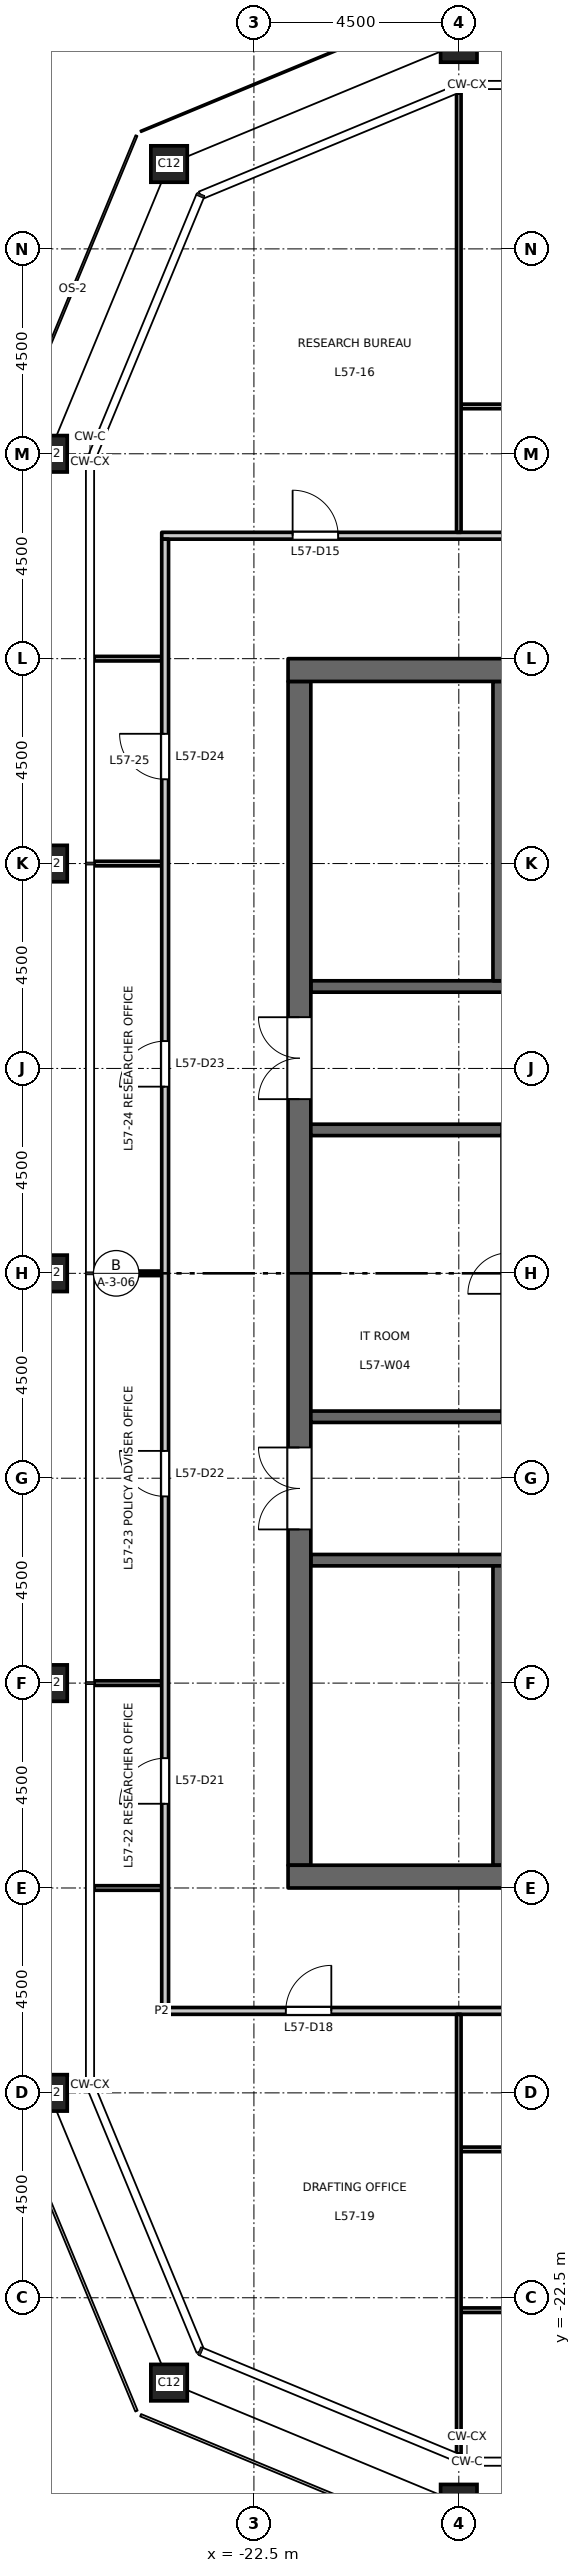
"""IFC4 building model, lengths in metres.
Left out: names, types, materials, properties, quantities, classifications, styles, units other than length and angle.
Written with IfcOpenShell. Run it as: python <this file> out.ifc"""

import sys

from ifc_helpers import new_model, si_unit, direction, frame, frame_2d, origin, origin_2d, place, context, subcontext, project, spatial, rectangle, hollow_rectangle, extrude, element, fill, save


model = new_model("IFC4")
c1 = context("Model", 3, precision=1e-05, world=origin(), true_north=direction((0.0, 1.0)))
c2 = subcontext(c1, "Body", "Model", "MODEL_VIEW")
j1 = project(units=[si_unit("LENGTHUNIT", "METRE"), si_unit("PLANEANGLEUNIT", "RADIAN")], contexts=[c1])
p1 = place(None, origin())
s1 = spatial("IfcSite", under=j1, at=p1, CompositionType="ELEMENT")
p2 = place(p1, origin())
s2 = spatial("IfcBuilding", under=s1, at=p2, CompositionType="ELEMENT")
p3 = place(p2, frame((0.0, 0.0, 264.7)))
s3 = spatial("IfcBuildingStorey", under=s2, at=p3, CompositionType="ELEMENT", Elevation=264.7)
for number, where, z_axis, x_axis in (
    (1, (-18.0, -27.0, 0.0), (0.0, 0.0, 1.0), (1.0, 0.0, 0.0)),
    (2, (-18.0, 27.0, 0.0), (0.0, 0.0, 1.0), (1.0, 0.0, 0.0)),
    (3, (-24.364, 24.364, 0.0), (0.0, 0.0, 1.0), (1.0, 0.0, 0.0)),
    (4, (-27.0, 18.0, 0.0), (0.0, 0.0, 1.0), (1.0, 0.0, 0.0)),
    (5, (-27.0, 9.0, 0.0), (0.0, 0.0, 1.0), (1.0, 0.0, 0.0)),
    (6, (-27.0, 0.0, 0.0), (0.0, 0.0, 1.0), (1.0, 0.0, 0.0)),
    (7, (-27.0, -9.0, 0.0), (0.0, 0.0, 1.0), (1.0, 0.0, 0.0)),
    (8, (-27.0, -18.0, 0.0), (0.0, 0.0, 1.0), (1.0, 0.0, 0.0)),
    (9, (-24.364, -24.364, 0.0), (0.0, 0.0, 1.0), (1.0, 0.0, 0.0)),
):
    element("IfcColumn", number, at=place(p3, frame(where, z_axis=z_axis, x_axis=x_axis)), inside=s3, PredefinedType="COLUMN", context=c2, shape_type="SweptSolid", body=[
        extrude(hollow_rectangle(XDim=0.8, YDim=0.8, WallThickness=0.045, at=origin_2d()), origin(), (0.0, 0.0, 1.0), 4.5),
    ])
p4 = place(p3, frame((-17.0, 6.3, 0.0), z_axis=(0.0, 0.0, 1.0), x_axis=(-1.0, 0.0, 0.0)))
e10 = element("IfcWall", 10, at=p4, inside=s3, PredefinedType="SHEAR", context=c2, shape_type="SweptSolid", body=[
    extrude(rectangle(XDim=4.25, YDim=0.25, at=frame_2d((2.125, 0.0))), origin(), (0.0, 0.0, 1.0), 4.35),
])
p5 = place(p3, frame((-12.15, -6.3, 0.0), z_axis=(0.0, 0.0, 1.0), x_axis=(-1.0, 0.0, 0.0)))
e11 = element("IfcWall", 11, at=p5, inside=s3, PredefinedType="SHEAR", context=c2, shape_type="SweptSolid", body=[
    extrude(rectangle(XDim=9.1, YDim=0.25, at=frame_2d((4.55, 0.0))), origin(), (0.0, 0.0, 1.0), 4.35),
])
p6 = place(p5, frame((1.8, 0.0, 0.0)))
e12 = element("IfcOpeningElement", 12, at=p6, cuts=e11, PredefinedType="OPENING", context=c2, shape_type="SweptSolid", body=[
    extrude(rectangle(XDim=1.0, YDim=2.1, at=frame_2d((0.5, 1.05))), frame((0.0, 0.135, 0.0), z_axis=(0.0, -1.0, 0.0), x_axis=(1.0, 0.0, 0.0)), (0.0, 0.0, 1.0), 0.27),
])
p7 = place(p3, frame((-21.5, -13.0, 0.0), z_axis=(0.0, 0.0, 1.0), x_axis=(0.0, 1.0, 0.0)))
e13 = element("IfcWall", 13, at=p7, inside=s3, PredefinedType="SHEAR", context=c2, shape_type="SweptSolid", body=[
    extrude(rectangle(XDim=26.0, YDim=0.5, at=frame_2d((13.0, 0.0))), origin(), (0.0, 0.0, 1.0), 4.35),
])
p8 = place(p7, frame((16.825, 0.0, 0.0)))
e14 = element("IfcOpeningElement", 14, at=p8, cuts=e13, PredefinedType="OPENING", context=c2, shape_type="SweptSolid", body=[
    extrude(rectangle(XDim=1.8, YDim=2.1, at=frame_2d((0.9, 1.05))), frame((0.0, 0.26, 0.0), z_axis=(0.0, -1.0, 0.0), x_axis=(1.0, 0.0, 0.0)), (0.0, 0.0, 1.0), 0.52),
])
p9 = place(p7, frame((7.375, 0.0, 0.0)))
e15 = element("IfcOpeningElement", 15, at=p9, cuts=e13, PredefinedType="OPENING", context=c2, shape_type="SweptSolid", body=[
    extrude(rectangle(XDim=1.8, YDim=2.1, at=frame_2d((0.9, 1.05))), frame((0.0, 0.26, 0.0), z_axis=(0.0, -1.0, 0.0), x_axis=(1.0, 0.0, 0.0)), (0.0, 0.0, 1.0), 0.52),
])
for number, where, z_axis, x_axis in (
    (16, (-17.05, 3.15, 0.0), (0.0, 0.0, 1.0), (-1.0, 0.0, 0.0)),
    (17, (-17.05, -3.15, 0.0), (0.0, 0.0, 1.0), (-1.0, 0.0, 0.0)),
):
    element("IfcWall", number, at=place(p3, frame(where, z_axis=z_axis, x_axis=x_axis)), inside=s3, PredefinedType="SHEAR", context=c2, shape_type="SweptSolid", body=[
        extrude(rectangle(XDim=4.2, YDim=0.25, at=frame_2d((2.1, 0.0))), origin(), (0.0, 0.0, 1.0), 4.35),
    ])
for number, where, z_axis, x_axis in (
    (18, (-17.0, 6.425, 0.0), (0.0, 0.0, 1.0), (0.0, 1.0, 0.0)),
    (19, (-17.0, -13.0, 0.0), (0.0, 0.0, 1.0), (0.0, 1.0, 0.0)),
):
    element("IfcWall", number, at=place(p3, frame(where, z_axis=z_axis, x_axis=x_axis)), inside=s3, PredefinedType="SHEAR", context=c2, shape_type="SweptSolid", body=[
        extrude(rectangle(XDim=6.575, YDim=0.5, at=frame_2d((3.288, 0.0))), origin(), (0.0, 0.0, 1.0), 4.35),
    ])
for number, where, z_axis, x_axis in (
    (20, (-8.25, 13.25, 0.0), (0.0, 0.0, 1.0), (-1.0, 0.0, 0.0)),
    (21, (-8.25, -13.25, 0.0), (0.0, 0.0, 1.0), (-1.0, 0.0, 0.0)),
):
    element("IfcWall", number, at=place(p3, frame(where, z_axis=z_axis, x_axis=x_axis)), inside=s3, PredefinedType="SHEAR", context=c2, shape_type="SweptSolid", body=[
        extrude(rectangle(XDim=13.5, YDim=0.5, at=frame_2d((6.75, 0.0))), origin(), (0.0, 0.0, 1.0), 4.35),
    ])
p10 = place(p3, frame((-17.95, -22.773, 0.0), z_axis=(0.0, 0.0, 1.0), x_axis=(1.0, 0.0, 0.0)))
e22 = element("IfcWall", 22, at=p10, inside=s3, PredefinedType="PARTITIONING", context=c2, shape_type="SweptSolid", body=[
    extrude(rectangle(XDim=8.9, YDim=0.1, at=frame_2d((4.45, 0.0))), origin(), (0.0, 0.0, 1.0), 4.35),
])
p11 = place(p10, frame((3.85, 0.0, 0.0)))
e23 = element("IfcOpeningElement", 23, at=p11, cuts=e22, PredefinedType="OPENING", context=c2, shape_type="SweptSolid", body=[
    extrude(rectangle(XDim=1.0, YDim=2.1, at=frame_2d((0.5, 1.05))), frame((0.0, 0.06, 0.0), z_axis=(0.0, -1.0, 0.0), x_axis=(1.0, 0.0, 0.0)), (0.0, 0.0, 1.0), 0.12),
])
p12 = place(p3, frame((-17.95, -19.241, 0.0), z_axis=(0.0, 0.0, 1.0), x_axis=(1.0, 0.0, 0.0)))
e24 = element("IfcWall", 24, at=p12, inside=s3, PredefinedType="PARTITIONING", context=c2, shape_type="SweptSolid", body=[
    extrude(rectangle(XDim=8.9, YDim=0.1, at=frame_2d((4.45, 0.0))), origin(), (0.0, 0.0, 1.0), 4.35),
])
p13 = place(p12, frame((3.85, 0.0, 0.0)))
e25 = element("IfcOpeningElement", 25, at=p13, cuts=e24, PredefinedType="OPENING", context=c2, shape_type="SweptSolid", body=[
    extrude(rectangle(XDim=1.0, YDim=2.1, at=frame_2d((0.5, 1.05))), frame((0.0, 0.06, 0.0), z_axis=(0.0, -1.0, 0.0), x_axis=(1.0, 0.0, 0.0)), (0.0, 0.0, 1.0), 0.12),
])
p14 = place(p3, frame((-24.525, -16.2, 0.0), z_axis=(0.0, 0.0, 1.0), x_axis=(1.0, 0.0, 0.0)))
e26 = element("IfcWall", 26, at=p14, inside=s3, PredefinedType="PARTITIONING", context=c2, shape_type="SweptSolid", body=[
    extrude(rectangle(XDim=49.05, YDim=0.15, at=frame_2d((24.525, 0.0))), origin(), (0.0, 0.0, 1.0), 4.35),
])
p15 = place(p14, frame((10.425, 0.0, 0.0)))
e27 = element("IfcOpeningElement", 27, at=p15, cuts=e26, PredefinedType="OPENING", context=c2, shape_type="SweptSolid", body=[
    extrude(rectangle(XDim=1.0, YDim=2.1, at=frame_2d((0.5, 1.05))), frame((0.0, 0.085, 0.0), z_axis=(0.0, -1.0, 0.0), x_axis=(1.0, 0.0, 0.0)), (0.0, 0.0, 1.0), 0.17),
])
p16 = place(p14, frame((19.425, 0.0, 0.0)))
e28 = element("IfcOpeningElement", 28, at=p16, cuts=e26, PredefinedType="OPENING", context=c2, shape_type="SweptSolid", body=[
    extrude(rectangle(XDim=1.0, YDim=2.1, at=frame_2d((0.5, 1.05))), frame((0.0, 0.085, 0.0), z_axis=(0.0, -1.0, 0.0), x_axis=(1.0, 0.0, 0.0)), (0.0, 0.0, 1.0), 0.17),
])
p17 = place(p14, frame((28.425, 0.0, 0.0)))
e29 = element("IfcOpeningElement", 29, at=p17, cuts=e26, PredefinedType="OPENING", context=c2, shape_type="SweptSolid", body=[
    extrude(rectangle(XDim=1.0, YDim=2.1, at=frame_2d((0.5, 1.05))), frame((0.0, 0.085, 0.0), z_axis=(0.0, -1.0, 0.0), x_axis=(1.0, 0.0, 0.0)), (0.0, 0.0, 1.0), 0.17),
])
p18 = place(p14, frame((35.175, 0.0, 0.0)))
e30 = element("IfcOpeningElement", 30, at=p18, cuts=e26, PredefinedType="OPENING", context=c2, shape_type="SweptSolid", body=[
    extrude(rectangle(XDim=1.0, YDim=2.1, at=frame_2d((0.5, 1.05))), frame((0.0, 0.085, 0.0), z_axis=(0.0, -1.0, 0.0), x_axis=(1.0, 0.0, 0.0)), (0.0, 0.0, 1.0), 0.17),
])
p19 = place(p14, frame((39.675, 0.0, 0.0)))
e31 = element("IfcOpeningElement", 31, at=p19, cuts=e26, PredefinedType="OPENING", context=c2, shape_type="SweptSolid", body=[
    extrude(rectangle(XDim=1.0, YDim=2.1, at=frame_2d((0.5, 1.05))), frame((0.0, 0.085, 0.0), z_axis=(0.0, -1.0, 0.0), x_axis=(1.0, 0.0, 0.0)), (0.0, 0.0, 1.0), 0.17),
])
p20 = place(p14, frame((2.725, 0.0, 0.0)))
e32 = element("IfcOpeningElement", 32, at=p20, cuts=e26, PredefinedType="OPENING", context=c2, shape_type="SweptSolid", body=[
    extrude(rectangle(XDim=1.0, YDim=2.1, at=frame_2d((0.5, 1.05))), frame((0.0, 0.085, 0.0), z_axis=(0.0, -1.0, 0.0), x_axis=(1.0, 0.0, 0.0)), (0.0, 0.0, 1.0), 0.17),
])
p21 = place(p3, frame((-26.01, -13.5, 0.0), z_axis=(0.0, 0.0, 1.0), x_axis=(1.0, 0.0, 0.0)))
e33 = element("IfcWall", 33, at=p21, inside=s3, PredefinedType="PARTITIONING", context=c2, shape_type="SweptSolid", body=[
    extrude(rectangle(XDim=1.485, YDim=0.1, at=frame_2d((0.743, 0.0))), origin(), (0.0, 0.0, 1.0), 3.95),
])
for number, where, z_axis, x_axis in (
    (34, (-26.01, -9.0, 0.0), (0.0, 0.0, 1.0), (1.0, 0.0, 0.0)),
    (35, (-26.01, 0.0, 0.0), (0.0, 0.0, 1.0), (1.0, 0.0, 0.0)),
    (36, (-26.01, 9.0, 0.0), (0.0, 0.0, 1.0), (1.0, 0.0, 0.0)),
    (37, (-26.01, 13.5, 0.0), (0.0, 0.0, 1.0), (1.0, 0.0, 0.0)),
):
    element("IfcWall", number, at=place(p3, frame(where, z_axis=z_axis, x_axis=x_axis)), inside=s3, PredefinedType="PARTITIONING", context=c2, shape_type="SweptSolid", body=[
        extrude(rectangle(XDim=1.485, YDim=0.1, at=frame_2d((0.743, 0.0))), origin(), (0.0, 0.0, 1.0), 4.35),
    ])
p22 = place(p3, frame((-24.525, 16.2, 0.0), z_axis=(0.0, 0.0, 1.0), x_axis=(1.0, 0.0, 0.0)))
e38 = element("IfcWall", 38, at=p22, inside=s3, PredefinedType="PARTITIONING", context=c2, shape_type="SweptSolid", body=[
    extrude(rectangle(XDim=49.05, YDim=0.15, at=frame_2d((24.525, 0.0))), origin(), (0.0, 0.0, 1.0), 4.35),
])
p23 = place(p22, frame((10.625, 0.0, 0.0)))
e39 = element("IfcOpeningElement", 39, at=p23, cuts=e38, PredefinedType="OPENING", context=c2, shape_type="SweptSolid", body=[
    extrude(rectangle(XDim=1.0, YDim=2.1, at=frame_2d((0.5, 1.05))), frame((0.0, 0.085, 0.0), z_axis=(0.0, -1.0, 0.0), x_axis=(1.0, 0.0, 0.0)), (0.0, 0.0, 1.0), 0.17),
])
p24 = place(p22, frame((19.625, 0.0, 0.0)))
e40 = element("IfcOpeningElement", 40, at=p24, cuts=e38, PredefinedType="OPENING", context=c2, shape_type="SweptSolid", body=[
    extrude(rectangle(XDim=1.0, YDim=2.1, at=frame_2d((0.5, 1.05))), frame((0.0, 0.085, 0.0), z_axis=(0.0, -1.0, 0.0), x_axis=(1.0, 0.0, 0.0)), (0.0, 0.0, 1.0), 0.17),
])
p25 = place(p22, frame((28.625, 0.0, 0.0)))
e41 = element("IfcOpeningElement", 41, at=p25, cuts=e38, PredefinedType="OPENING", context=c2, shape_type="SweptSolid", body=[
    extrude(rectangle(XDim=1.0, YDim=2.1, at=frame_2d((0.5, 1.05))), frame((0.0, 0.085, 0.0), z_axis=(0.0, -1.0, 0.0), x_axis=(1.0, 0.0, 0.0)), (0.0, 0.0, 1.0), 0.17),
])
p26 = place(p22, frame((37.625, 0.0, 0.0)))
e42 = element("IfcOpeningElement", 42, at=p26, cuts=e38, PredefinedType="OPENING", context=c2, shape_type="SweptSolid", body=[
    extrude(rectangle(XDim=1.0, YDim=2.1, at=frame_2d((0.5, 1.05))), frame((0.0, 0.085, 0.0), z_axis=(0.0, -1.0, 0.0), x_axis=(1.0, 0.0, 0.0)), (0.0, 0.0, 1.0), 0.17),
])
p27 = place(p22, frame((2.875, 0.0, 0.0)))
e43 = element("IfcOpeningElement", 43, at=p27, cuts=e38, PredefinedType="OPENING", context=c2, shape_type="SweptSolid", body=[
    extrude(rectangle(XDim=1.0, YDim=2.1, at=frame_2d((0.5, 1.05))), frame((0.0, 0.085, 0.0), z_axis=(0.0, -1.0, 0.0), x_axis=(1.0, 0.0, 0.0)), (0.0, 0.0, 1.0), 0.17),
])
p28 = place(p3, frame((-17.95, 19.04, 0.0), z_axis=(0.0, 0.0, 1.0), x_axis=(1.0, 0.0, 0.0)))
e44 = element("IfcWall", 44, at=p28, inside=s3, PredefinedType="PARTITIONING", context=c2, shape_type="SweptSolid", body=[
    extrude(rectangle(XDim=8.9, YDim=0.1, at=frame_2d((4.45, 0.0))), origin(), (0.0, 0.0, 1.0), 4.35),
])
p29 = place(p28, frame((4.05, 0.0, 0.0)))
e45 = element("IfcOpeningElement", 45, at=p29, cuts=e44, PredefinedType="OPENING", context=c2, shape_type="SweptSolid", body=[
    extrude(rectangle(XDim=1.0, YDim=2.1, at=frame_2d((0.5, 1.05))), frame((0.0, 0.06, 0.0), z_axis=(0.0, -1.0, 0.0), x_axis=(1.0, 0.0, 0.0)), (0.0, 0.0, 1.0), 0.12),
])
p30 = place(p3, frame((-24.45, -16.125, 0.0), z_axis=(0.0, 0.0, 1.0), x_axis=(0.0, 1.0, 0.0)))
e46 = element("IfcWall", 46, at=p30, inside=s3, PredefinedType="PARTITIONING", context=c2, shape_type="SweptSolid", body=[
    extrude(rectangle(XDim=32.25, YDim=0.15, at=frame_2d((16.125, 0.0))), origin(), (0.0, 0.0, 1.0), 4.35),
])
p31 = place(p30, frame((4.475, 0.0, 0.0)))
e47 = element("IfcOpeningElement", 47, at=p31, cuts=e46, PredefinedType="OPENING", context=c2, shape_type="SweptSolid", body=[
    extrude(rectangle(XDim=1.0, YDim=2.1, at=frame_2d((0.5, 1.05))), frame((0.0, 0.085, 0.0), z_axis=(0.0, -1.0, 0.0), x_axis=(1.0, 0.0, 0.0)), (0.0, 0.0, 1.0), 0.17),
])
p32 = place(p30, frame((11.225, 0.0, 0.0)))
e48 = element("IfcOpeningElement", 48, at=p32, cuts=e46, PredefinedType="OPENING", context=c2, shape_type="SweptSolid", body=[
    extrude(rectangle(XDim=1.0, YDim=2.1, at=frame_2d((0.5, 1.05))), frame((0.0, 0.085, 0.0), z_axis=(0.0, -1.0, 0.0), x_axis=(1.0, 0.0, 0.0)), (0.0, 0.0, 1.0), 0.17),
])
p33 = place(p30, frame((20.225, 0.0, 0.0)))
e49 = element("IfcOpeningElement", 49, at=p33, cuts=e46, PredefinedType="OPENING", context=c2, shape_type="SweptSolid", body=[
    extrude(rectangle(XDim=1.0, YDim=2.1, at=frame_2d((0.5, 1.05))), frame((0.0, 0.085, 0.0), z_axis=(0.0, -1.0, 0.0), x_axis=(1.0, 0.0, 0.0)), (0.0, 0.0, 1.0), 0.17),
])
p34 = place(p30, frame((26.975, 0.0, 0.0)))
e50 = element("IfcOpeningElement", 50, at=p34, cuts=e46, PredefinedType="OPENING", context=c2, shape_type="SweptSolid", body=[
    extrude(rectangle(XDim=1.0, YDim=2.1, at=frame_2d((0.5, 1.05))), frame((0.0, 0.085, 0.0), z_axis=(0.0, -1.0, 0.0), x_axis=(1.0, 0.0, 0.0)), (0.0, 0.0, 1.0), 0.17),
])
for number, where, z_axis, x_axis in (
    (51, (-18.0, -25.928, 0.0), (0.0, 0.0, 1.0), (0.0, 1.0, 0.0)),
    (52, (-18.0, 16.275, 0.0), (0.0, 0.0, 1.0), (0.0, 1.0, 0.0)),
):
    element("IfcWall", number, at=place(p3, frame(where, z_axis=z_axis, x_axis=x_axis)), inside=s3, PredefinedType="PARTITIONING", context=c2, shape_type="SweptSolid", body=[
        extrude(rectangle(XDim=9.653, YDim=0.1, at=frame_2d((4.827, 0.0))), origin(), (0.0, 0.0, 1.0), 3.65),
    ])
p35 = place(p8, origin())
e53 = element("IfcDoor", 53, at=p35, inside=s3, OperationType="DOUBLE_DOOR_DOUBLE_SWING", PredefinedType="DOOR", context=c2, shape_type="SweptSolid", body=[
    extrude(rectangle(XDim=1.8, YDim=2.1, at=frame_2d((0.9, 1.05))), frame((0.0, 0.025, 0.0), z_axis=(0.0, -1.0, 0.0), x_axis=(1.0, 0.0, 0.0)), (0.0, 0.0, 1.0), 0.05),
])
fill(e14, e53)
p36 = place(p9, origin())
e54 = element("IfcDoor", 54, at=p36, inside=s3, OperationType="DOUBLE_DOOR_DOUBLE_SWING", PredefinedType="DOOR", context=c2, shape_type="SweptSolid", body=[
    extrude(rectangle(XDim=1.8, YDim=2.1, at=frame_2d((0.9, 1.05))), frame((0.0, 0.025, 0.0), z_axis=(0.0, -1.0, 0.0), x_axis=(1.0, 0.0, 0.0)), (0.0, 0.0, 1.0), 0.05),
])
fill(e15, e54)
p37 = place(p27, origin())
e55 = element("IfcDoor", 55, at=p37, inside=s3, OperationType="SINGLE_SWING_LEFT", PredefinedType="DOOR", context=c2, shape_type="SweptSolid", body=[
    extrude(rectangle(XDim=1.0, YDim=2.1, at=frame_2d((0.5, 1.05))), frame((0.0, 0.025, 0.0), z_axis=(0.0, -1.0, 0.0), x_axis=(1.0, 0.0, 0.0)), (0.0, 0.0, 1.0), 0.05),
])
fill(e43, e55)
p38 = place(p20, origin())
e56 = element("IfcDoor", 56, at=p38, inside=s3, OperationType="SINGLE_SWING_RIGHT", PredefinedType="DOOR", context=c2, shape_type="SweptSolid", body=[
    extrude(rectangle(XDim=1.0, YDim=2.1, at=frame_2d((0.5, 1.05))), frame((0.0, 0.025, 0.0), z_axis=(0.0, -1.0, 0.0), x_axis=(1.0, 0.0, 0.0)), (0.0, 0.0, 1.0), 0.05),
])
fill(e32, e56)
p39 = place(p31, origin())
e57 = element("IfcDoor", 57, at=p39, inside=s3, OperationType="SINGLE_SWING_LEFT", PredefinedType="DOOR", context=c2, shape_type="SweptSolid", body=[
    extrude(rectangle(XDim=1.0, YDim=2.1, at=frame_2d((0.5, 1.05))), frame((0.0, 0.025, 0.0), z_axis=(0.0, -1.0, 0.0), x_axis=(1.0, 0.0, 0.0)), (0.0, 0.0, 1.0), 0.05),
])
fill(e47, e57)
p40 = place(p32, origin())
e58 = element("IfcDoor", 58, at=p40, inside=s3, OperationType="SINGLE_SWING_RIGHT", PredefinedType="DOOR", context=c2, shape_type="SweptSolid", body=[
    extrude(rectangle(XDim=1.0, YDim=2.1, at=frame_2d((0.5, 1.05))), frame((0.0, 0.025, 0.0), z_axis=(0.0, -1.0, 0.0), x_axis=(1.0, 0.0, 0.0)), (0.0, 0.0, 1.0), 0.05),
])
fill(e48, e58)
p41 = place(p33, origin())
e59 = element("IfcDoor", 59, at=p41, inside=s3, OperationType="SINGLE_SWING_LEFT", PredefinedType="DOOR", context=c2, shape_type="SweptSolid", body=[
    extrude(rectangle(XDim=1.0, YDim=2.1, at=frame_2d((0.5, 1.05))), frame((0.0, 0.025, 0.0), z_axis=(0.0, -1.0, 0.0), x_axis=(1.0, 0.0, 0.0)), (0.0, 0.0, 1.0), 0.05),
])
fill(e49, e59)
p42 = place(p34, origin())
e60 = element("IfcDoor", 60, at=p42, inside=s3, OperationType="SINGLE_SWING_RIGHT", PredefinedType="DOOR", context=c2, shape_type="SweptSolid", body=[
    extrude(rectangle(XDim=1.0, YDim=2.1, at=frame_2d((0.5, 1.05))), frame((0.0, 0.025, 0.0), z_axis=(0.0, -1.0, 0.0), x_axis=(1.0, 0.0, 0.0)), (0.0, 0.0, 1.0), 0.05),
])
fill(e50, e60)
save(model, sys.argv[1])
